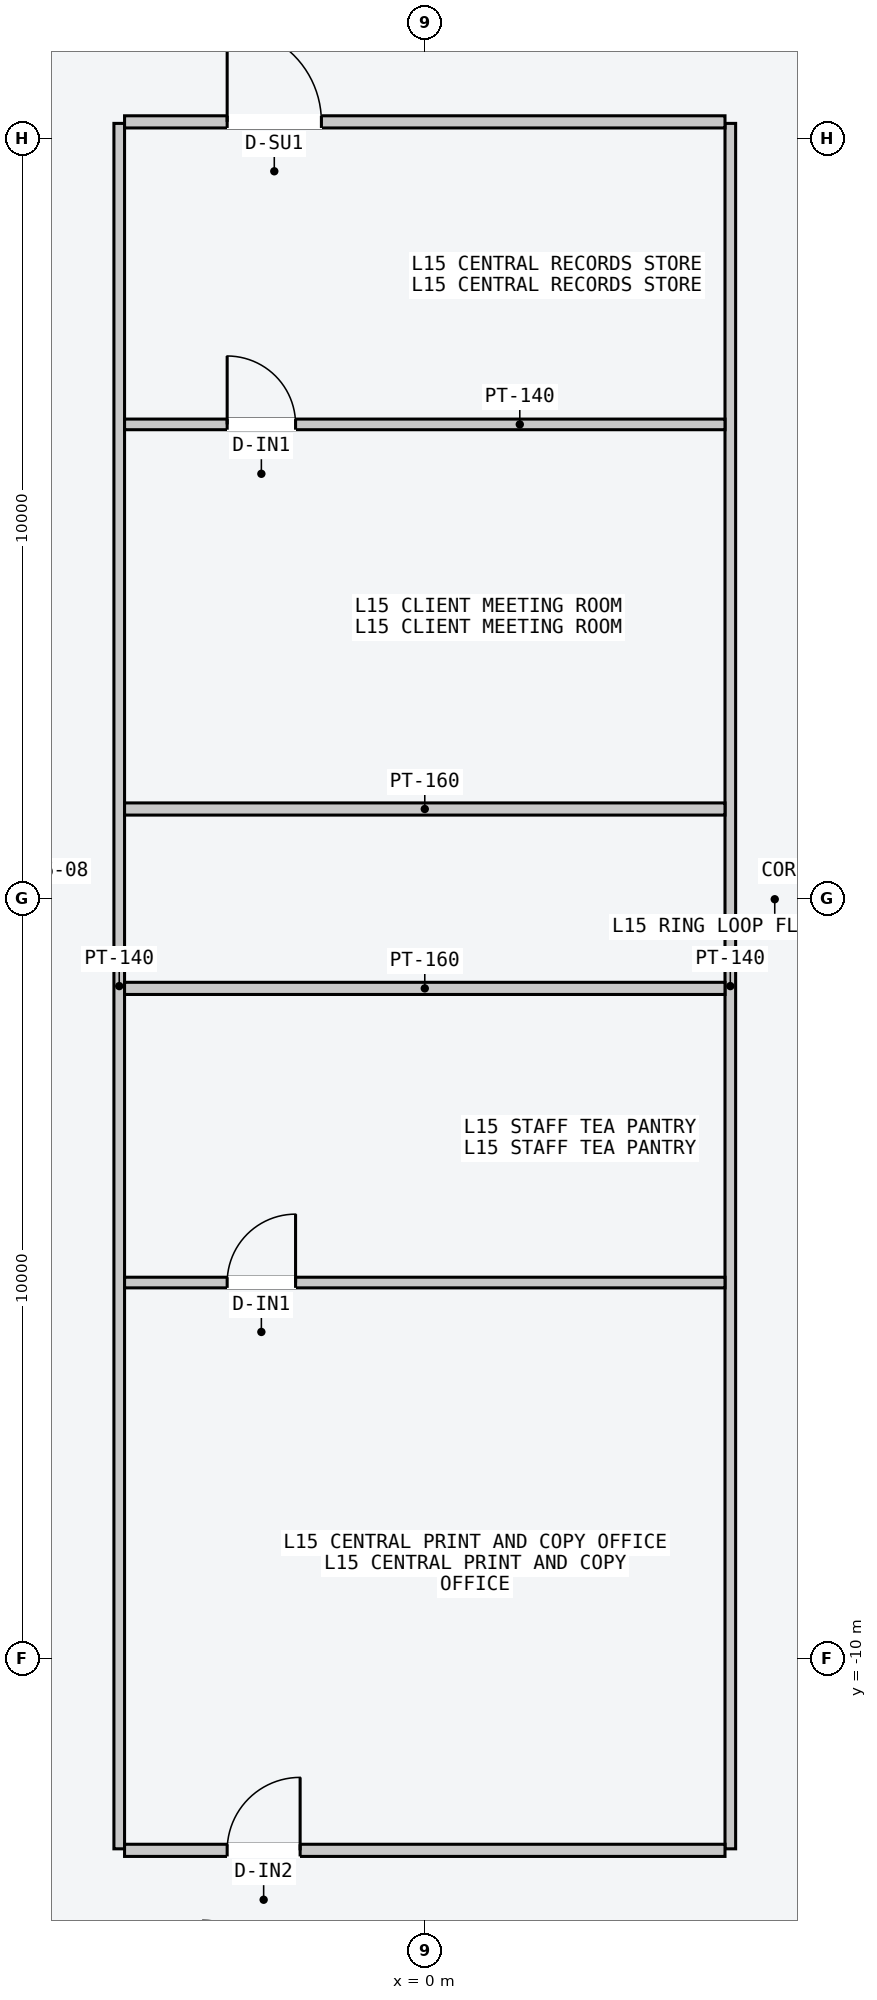
"""IFC4 building model, lengths in metres.
Left out: names, types, materials, properties, quantities, classifications, styles, units other than length and angle.
Written with IfcOpenShell. Run it as: python <this file> out.ifc"""

import sys

from ifc_helpers import new_model, si_unit, direction, frame, frame_2d, origin, place, context, subcontext, project, spatial, rectangle, extrude, element, fill, save


model = new_model("IFC4")
c1 = context("Model", 3, precision=1e-05, world=origin(), true_north=direction((0.0, 1.0)))
c2 = subcontext(c1, "Body", "Model", "MODEL_VIEW")
j1 = project(units=[si_unit("LENGTHUNIT", "METRE"), si_unit("PLANEANGLEUNIT", "RADIAN")], contexts=[c1])
p1 = place(None, origin())
s1 = spatial("IfcSite", under=j1, at=p1, CompositionType="ELEMENT")
p2 = place(p1, origin())
s2 = spatial("IfcBuilding", under=s1, at=p2, CompositionType="ELEMENT")
p3 = place(p2, frame((0.0, 0.0, 60.0)))
s3 = spatial("IfcBuildingStorey", under=s2, at=p3, CompositionType="ELEMENT", Elevation=60.0)
for number, where, z_axis, x_axis in (
    (1, (-4.02, -12.5, 0.0), (0.0, 0.0, 1.0), (0.0, 1.0, 0.0)),
    (2, (4.02, -12.5, 0.0), (0.0, 0.0, 1.0), (0.0, 1.0, 0.0)),
):
    element("IfcWall", number, at=place(p3, frame(where, z_axis=z_axis, x_axis=x_axis)), inside=s3, PredefinedType="PARTITIONING", context=c2, shape_type="SweptSolid", body=[
        extrude(rectangle(XDim=22.7, YDim=0.14, at=frame_2d((11.35, 0.0))), origin(), (0.0, 0.0, 1.0), 3.4),
    ])
p4 = place(p3, frame((-3.95, 1.18, 0.0), z_axis=(0.0, 0.0, 1.0), x_axis=(1.0, 0.0, 0.0)))
e3 = element("IfcWall", 3, at=p4, inside=s3, PredefinedType="PARTITIONING", context=c2, shape_type="SweptSolid", body=[
    extrude(rectangle(XDim=7.9, YDim=0.16, at=frame_2d((3.95, 0.0))), origin(), (0.0, 0.0, 1.0), 3.4),
])
p5 = place(p3, frame((-3.95, 10.22, 0.0), z_axis=(0.0, 0.0, 1.0), x_axis=(1.0, 0.0, 0.0)))
e4 = element("IfcWall", 4, at=p5, inside=s3, PredefinedType="PARTITIONING", context=c2, shape_type="SweptSolid", body=[
    extrude(rectangle(XDim=7.9, YDim=0.16, at=frame_2d((3.95, 0.0))), origin(), (0.0, 0.0, 1.0), 3.4),
])
p6 = place(p5, frame((1.35, 0.0, 0.0)))
e5 = element("IfcOpeningElement", 5, at=p6, cuts=e4, PredefinedType="OPENING", context=c2, shape_type="SweptSolid", body=[
    extrude(rectangle(XDim=1.24, YDim=2.24, at=frame_2d((0.62, 1.12))), frame((0.0, 0.09, 0.0), z_axis=(0.0, -1.0, 0.0), x_axis=(1.0, 0.0, 0.0)), (0.0, 0.0, 1.0), 0.18),
])
p7 = place(p3, frame((-3.95, -1.18, 0.0), z_axis=(0.0, 0.0, 1.0), x_axis=(1.0, 0.0, 0.0)))
e6 = element("IfcWall", 6, at=p7, inside=s3, PredefinedType="PARTITIONING", context=c2, shape_type="SweptSolid", body=[
    extrude(rectangle(XDim=7.9, YDim=0.16, at=frame_2d((3.95, 0.0))), origin(), (0.0, 0.0, 1.0), 3.4),
])
p8 = place(p3, frame((-3.95, -12.52, 0.0), z_axis=(0.0, 0.0, 1.0), x_axis=(1.0, 0.0, 0.0)))
e7 = element("IfcWall", 7, at=p8, inside=s3, PredefinedType="PARTITIONING", context=c2, shape_type="SweptSolid", body=[
    extrude(rectangle(XDim=7.9, YDim=0.16, at=frame_2d((3.95, 0.0))), origin(), (0.0, 0.0, 1.0), 3.4),
])
p9 = place(p8, frame((1.35, 0.0, 0.0)))
e8 = element("IfcOpeningElement", 8, at=p9, cuts=e7, PredefinedType="OPENING", context=c2, shape_type="SweptSolid", body=[
    extrude(rectangle(XDim=0.96, YDim=2.18, at=frame_2d((0.48, 1.09))), frame((0.0, 0.09, 0.0), z_axis=(0.0, -1.0, 0.0), x_axis=(1.0, 0.0, 0.0)), (0.0, 0.0, 1.0), 0.18),
])
p10 = place(p3, frame((-3.95, 6.24, 0.0), z_axis=(0.0, 0.0, 1.0), x_axis=(1.0, 0.0, 0.0)))
e9 = element("IfcWall", 9, at=p10, inside=s3, PredefinedType="PARTITIONING", context=c2, shape_type="SweptSolid", body=[
    extrude(rectangle(XDim=7.9, YDim=0.14, at=frame_2d((3.95, 0.0))), origin(), (0.0, 0.0, 1.0), 3.4),
])
p11 = place(p10, frame((1.35, 0.0, 0.0)))
e10 = element("IfcOpeningElement", 10, at=p11, cuts=e9, PredefinedType="OPENING", context=c2, shape_type="SweptSolid", body=[
    extrude(rectangle(XDim=0.9, YDim=2.15, at=frame_2d((0.45, 1.075))), frame((0.0, 0.08, 0.0), z_axis=(0.0, -1.0, 0.0), x_axis=(1.0, 0.0, 0.0)), (0.0, 0.0, 1.0), 0.16),
])
p12 = place(p3, frame((-3.95, -5.05, 0.0), z_axis=(0.0, 0.0, 1.0), x_axis=(1.0, 0.0, 0.0)))
e11 = element("IfcWall", 11, at=p12, inside=s3, PredefinedType="PARTITIONING", context=c2, shape_type="SweptSolid", body=[
    extrude(rectangle(XDim=7.9, YDim=0.14, at=frame_2d((3.95, 0.0))), origin(), (0.0, 0.0, 1.0), 3.4),
])
p13 = place(p12, frame((1.35, 0.0, 0.0)))
e12 = element("IfcOpeningElement", 12, at=p13, cuts=e11, PredefinedType="OPENING", context=c2, shape_type="SweptSolid", body=[
    extrude(rectangle(XDim=0.9, YDim=2.15, at=frame_2d((0.45, 1.075))), frame((0.0, 0.08, 0.0), z_axis=(0.0, -1.0, 0.0), x_axis=(1.0, 0.0, 0.0)), (0.0, 0.0, 1.0), 0.16),
])
p14 = place(p6, origin())
e13 = element("IfcDoor", 13, at=p14, inside=s3, OperationType="SINGLE_SWING_LEFT", PredefinedType="DOOR", context=c2, shape_type="SweptSolid", body=[
    extrude(rectangle(XDim=1.24, YDim=2.24, at=frame_2d((0.62, 1.12))), frame((0.0, 0.025, 0.0), z_axis=(0.0, -1.0, 0.0), x_axis=(1.0, 0.0, 0.0)), (0.0, 0.0, 1.0), 0.05),
])
fill(e5, e13)
p15 = place(p9, origin())
e14 = element("IfcDoor", 14, at=p15, inside=s3, OperationType="SINGLE_SWING_RIGHT", PredefinedType="DOOR", context=c2, shape_type="SweptSolid", body=[
    extrude(rectangle(XDim=0.96, YDim=2.18, at=frame_2d((0.48, 1.09))), frame((0.0, 0.025, 0.0), z_axis=(0.0, -1.0, 0.0), x_axis=(1.0, 0.0, 0.0)), (0.0, 0.0, 1.0), 0.05),
])
fill(e8, e14)
p16 = place(p11, origin())
e15 = element("IfcDoor", 15, at=p16, inside=s3, OperationType="SINGLE_SWING_LEFT", PredefinedType="DOOR", context=c2, shape_type="SweptSolid", body=[
    extrude(rectangle(XDim=0.9, YDim=2.15, at=frame_2d((0.45, 1.075))), frame((0.0, 0.025, 0.0), z_axis=(0.0, -1.0, 0.0), x_axis=(1.0, 0.0, 0.0)), (0.0, 0.0, 1.0), 0.05),
])
fill(e10, e15)
p17 = place(p13, origin())
e16 = element("IfcDoor", 16, at=p17, inside=s3, OperationType="SINGLE_SWING_RIGHT", PredefinedType="DOOR", context=c2, shape_type="SweptSolid", body=[
    extrude(rectangle(XDim=0.9, YDim=2.15, at=frame_2d((0.45, 1.075))), frame((0.0, 0.025, 0.0), z_axis=(0.0, -1.0, 0.0), x_axis=(1.0, 0.0, 0.0)), (0.0, 0.0, 1.0), 0.05),
])
fill(e12, e16)
save(model, sys.argv[1])
